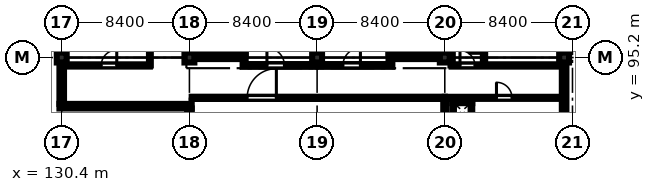
"""IFC4 building model, lengths in metres.
Left out: names, types, materials, properties, quantities, classifications, styles, units other than length and angle.
Written with IfcOpenShell. Run it as: python <this file> out.ifc"""

import sys

from ifc_helpers import new_model, si_unit, direction, frame, frame_2d, origin, origin_2d, place, context, subcontext, project, spatial, rectangle, extrude, element, fill, save


model = new_model("IFC4")
c1 = context("Model", 3, precision=1e-05, world=origin(), true_north=direction((0.0, 1.0)))
c2 = subcontext(c1, "Body", "Model", "MODEL_VIEW")
j1 = project(units=[si_unit("LENGTHUNIT", "METRE"), si_unit("PLANEANGLEUNIT", "RADIAN")], contexts=[c1])
p1 = place(None, origin())
s1 = spatial("IfcSite", under=j1, at=p1, CompositionType="ELEMENT")
p2 = place(p1, origin())
s2 = spatial("IfcBuilding", under=s1, at=p2, CompositionType="ELEMENT")
p3 = place(p2, frame((0.0, 0.0, 61.2)))
s3 = spatial("IfcBuildingStorey", under=s2, at=p3, CompositionType="ELEMENT", Elevation=61.2)
for number, where, z_axis, x_axis in (
    (1, (130.4, 95.2, 0.0), (0.0, 0.0, 1.0), (1.0, 0.0, 0.0)),
    (2, (138.8, 95.2, 0.0), (0.0, 0.0, 1.0), (1.0, 0.0, 0.0)),
    (3, (147.2, 95.2, 0.0), (0.0, 0.0, 1.0), (1.0, 0.0, 0.0)),
    (4, (155.6, 95.2, 0.0), (0.0, 0.0, 1.0), (1.0, 0.0, 0.0)),
    (5, (163.45, 95.2, 0.0), (0.0, 0.0, 1.0), (1.0, 0.0, 0.0)),
):
    element("IfcColumn", number, at=place(p3, frame(where, z_axis=z_axis, x_axis=x_axis)), inside=s3, PredefinedType="COLUMN", context=c2, shape_type="SweptSolid", body=[
        extrude(rectangle(XDim=0.65, YDim=0.65, at=origin_2d()), origin(), (0.0, 0.0, 1.0), 4.28),
    ])
p4 = place(p3, frame((138.7, 95.275, 0.0), z_axis=(0.0, 0.0, 1.0), x_axis=(1.0, 0.0, 0.0)))
e6 = element("IfcWall", 6, at=p4, inside=s3, PredefinedType="SHEAR", context=c2, shape_type="SweptSolid", body=[
    extrude(rectangle(XDim=3.8, YDim=0.35, at=frame_2d((1.9, 0.0))), origin(), (0.0, 0.0, 1.0), 4.28),
])
p5 = place(p3, frame((138.875, 95.45, 0.0), z_axis=(0.0, 0.0, 1.0), x_axis=(0.0, 1.0, 0.0)))
e7 = element("IfcWall", 7, at=p5, inside=s3, PredefinedType="SHEAR", context=c2, shape_type="SweptSolid", body=[
    extrude(rectangle(XDim=7.9, YDim=0.35, at=frame_2d((3.95, 0.0))), origin(), (0.0, 0.0, 1.0), 4.28),
])
p6 = place(p3, frame((142.325, 95.45, 0.0), z_axis=(0.0, 0.0, 1.0), x_axis=(0.0, 1.0, 0.0)))
e8 = element("IfcWall", 8, at=p6, inside=s3, PredefinedType="SHEAR", context=c2, shape_type="SweptSolid", body=[
    extrude(rectangle(XDim=7.9, YDim=0.35, at=frame_2d((3.95, 0.0))), origin(), (0.0, 0.0, 1.0), 4.28),
])
p7 = place(p6, frame((0.22, 0.0, 0.0)))
e9 = element("IfcOpeningElement", 9, at=p7, cuts=e8, PredefinedType="OPENING", context=c2, shape_type="SweptSolid", body=[
    extrude(rectangle(XDim=1.15, YDim=2.15, at=frame_2d((0.575, 1.075))), frame((0.0, 0.185, 0.0), z_axis=(0.0, -1.0, 0.0), x_axis=(1.0, 0.0, 0.0)), (0.0, 0.0, 1.0), 0.37),
])
p8 = place(p3, frame((151.9, 95.275, 0.0), z_axis=(0.0, 0.0, 1.0), x_axis=(1.0, 0.0, 0.0)))
e10 = element("IfcWall", 10, at=p8, inside=s3, PredefinedType="SHEAR", context=c2, shape_type="SweptSolid", body=[
    extrude(rectangle(XDim=3.8, YDim=0.35, at=frame_2d((1.9, 0.0))), origin(), (0.0, 0.0, 1.0), 4.28),
])
p9 = place(p3, frame((152.075, 95.45, 0.0), z_axis=(0.0, 0.0, 1.0), x_axis=(0.0, 1.0, 0.0)))
e11 = element("IfcWall", 11, at=p9, inside=s3, PredefinedType="SHEAR", context=c2, shape_type="SweptSolid", body=[
    extrude(rectangle(XDim=7.9, YDim=0.35, at=frame_2d((3.95, 0.0))), origin(), (0.0, 0.0, 1.0), 4.28),
])
p10 = place(p9, frame((0.35, 0.0, 0.0)))
e12 = element("IfcOpeningElement", 12, at=p10, cuts=e11, PredefinedType="OPENING", context=c2, shape_type="SweptSolid", body=[
    extrude(rectangle(XDim=1.15, YDim=2.15, at=frame_2d((0.575, 1.075))), frame((0.0, 0.185, 0.0), z_axis=(0.0, -1.0, 0.0), x_axis=(1.0, 0.0, 0.0)), (0.0, 0.0, 1.0), 0.37),
])
p11 = place(p3, frame((155.525, 95.45, 0.0), z_axis=(0.0, 0.0, 1.0), x_axis=(0.0, 1.0, 0.0)))
e13 = element("IfcWall", 13, at=p11, inside=s3, PredefinedType="SHEAR", context=c2, shape_type="SweptSolid", body=[
    extrude(rectangle(XDim=7.9, YDim=0.35, at=frame_2d((3.95, 0.0))), origin(), (0.0, 0.0, 1.0), 4.28),
])
p12 = place(p3, frame((163.45, 94.875, 0.0), z_axis=(0.0, 0.0, 1.0), x_axis=(0.0, -1.0, 0.0)))
e14 = element("IfcWall", 14, at=p12, inside=s3, PredefinedType="STANDARD", context=c2, shape_type="SweptSolid", body=[
    extrude(rectangle(XDim=7.75, YDim=0.3, at=frame_2d((3.875, 0.0))), origin(), (0.0, 0.0, 1.0), 3.58),
])
p13 = place(p12, frame((4.2, 0.0, 1.1)))
e15 = element("IfcOpeningElement", 15, at=p13, cuts=e14, PredefinedType="OPENING", context=c2, shape_type="SweptSolid", body=[
    extrude(rectangle(XDim=1.8, YDim=1.8, at=frame_2d((0.9, 0.9))), frame((0.0, 0.16, 0.0), z_axis=(0.0, -1.0, 0.0), x_axis=(1.0, 0.0, 0.0)), (0.0, 0.0, 1.0), 0.32),
])
p14 = place(p3, frame((163.45, 103.275, 0.0), z_axis=(0.0, 0.0, 1.0), x_axis=(0.0, -1.0, 0.0)))
e16 = element("IfcWall", 16, at=p14, inside=s3, PredefinedType="STANDARD", context=c2, shape_type="SweptSolid", body=[
    extrude(rectangle(XDim=7.75, YDim=0.3, at=frame_2d((3.875, 0.0))), origin(), (0.0, 0.0, 1.0), 3.58),
])
p15 = place(p14, frame((1.15, 0.0, 1.1)))
e17 = element("IfcOpeningElement", 17, at=p15, cuts=e16, PredefinedType="OPENING", context=c2, shape_type="SweptSolid", body=[
    extrude(rectangle(XDim=1.4, YDim=1.4, at=frame_2d((0.7, 0.7))), frame((0.0, 0.16, 0.0), z_axis=(0.0, -1.0, 0.0), x_axis=(1.0, 0.0, 0.0)), (0.0, 0.0, 1.0), 0.32),
])
p16 = place(p3, frame((130.4, 92.15, 0.0), z_axis=(0.0, 0.0, 1.0), x_axis=(0.0, 1.0, 0.0)))
e18 = element("IfcWall", 18, at=p16, inside=s3, PredefinedType="STANDARD", context=c2, shape_type="SweptSolid", body=[
    extrude(rectangle(XDim=2.725, YDim=0.3, at=frame_2d((1.363, 0.0))), origin(), (0.0, 0.0, 1.0), 4.28),
])
p17 = place(p3, frame((138.8, 87.125, 0.0), z_axis=(0.0, 0.0, 1.0), x_axis=(0.0, 1.0, 0.0)))
e19 = element("IfcWall", 19, at=p17, inside=s3, PredefinedType="STANDARD", context=c2, shape_type="SweptSolid", body=[
    extrude(rectangle(XDim=4.725, YDim=0.3, at=frame_2d((2.363, 0.0))), origin(), (0.0, 0.0, 1.0), 3.58),
])
p18 = place(p17, frame((2.4, 0.0, 0.95)))
e20 = element("IfcOpeningElement", 20, at=p18, cuts=e19, PredefinedType="OPENING", context=c2, shape_type="SweptSolid", body=[
    extrude(rectangle(XDim=1.5, YDim=1.8, at=frame_2d((0.75, 0.9))), frame((0.0, 0.16, 0.0), z_axis=(0.0, -1.0, 0.0), x_axis=(1.0, 0.0, 0.0)), (0.0, 0.0, 1.0), 0.32),
])
p19 = place(p3, frame((130.4, 95.525, 0.0), z_axis=(0.0, 0.0, 1.0), x_axis=(0.0, 1.0, 0.0)))
e21 = element("IfcWall", 21, at=p19, inside=s3, PredefinedType="STANDARD", context=c2, shape_type="SweptSolid", body=[
    extrude(rectangle(XDim=7.75, YDim=0.3, at=frame_2d((3.875, 0.0))), origin(), (0.0, 0.0, 1.0), 3.58),
])
p20 = place(p19, frame((2.4, 0.0, 1.0)))
e22 = element("IfcOpeningElement", 22, at=p20, cuts=e21, PredefinedType="OPENING", context=c2, shape_type="SweptSolid", body=[
    extrude(rectangle(XDim=1.8, YDim=1.8, at=frame_2d((0.9, 0.9))), frame((0.0, 0.16, 0.0), z_axis=(0.0, -1.0, 0.0), x_axis=(1.0, 0.0, 0.0)), (0.0, 0.0, 1.0), 0.32),
])
p21 = place(p3, frame((138.95, 92.0, 0.0), z_axis=(0.0, 0.0, 1.0), x_axis=(-1.0, 0.0, 0.0)))
e23 = element("IfcWall", 23, at=p21, inside=s3, PredefinedType="STANDARD", context=c2, shape_type="SweptSolid", body=[
    extrude(rectangle(XDim=8.7, YDim=0.3, at=frame_2d((4.35, 0.0))), origin(), (0.0, 0.0, 1.0), 4.28),
])
p22 = place(p3, frame((142.3, 94.68, 0.0), z_axis=(0.0, 0.0, 1.0), x_axis=(1.0, 0.0, 0.0)))
e24 = element("IfcWall", 24, at=p22, inside=s3, PredefinedType="STANDARD", context=c2, shape_type="SweptSolid", body=[
    extrude(rectangle(XDim=4.8, YDim=0.18, at=frame_2d((2.4, 0.0))), origin(), (0.0, 0.0, 1.0), 4.28),
])
p23 = place(p22, frame((1.6, 0.0, 0.0)))
e25 = element("IfcOpeningElement", 25, at=p23, cuts=e24, PredefinedType="OPENING", context=c2, shape_type="SweptSolid", body=[
    extrude(rectangle(XDim=1.15, YDim=2.15, at=frame_2d((0.575, 1.075))), frame((0.0, 0.1, 0.0), z_axis=(0.0, -1.0, 0.0), x_axis=(1.0, 0.0, 0.0)), (0.0, 0.0, 1.0), 0.2),
])
p24 = place(p3, frame((147.3, 94.68, 0.0), z_axis=(0.0, 0.0, 1.0), x_axis=(1.0, 0.0, 0.0)))
e26 = element("IfcWall", 26, at=p24, inside=s3, PredefinedType="STANDARD", context=c2, shape_type="SweptSolid", body=[
    extrude(rectangle(XDim=4.85, YDim=0.18, at=frame_2d((2.425, 0.0))), origin(), (0.0, 0.0, 1.0), 4.28),
])
p25 = place(p24, frame((1.6, 0.0, 0.0)))
e27 = element("IfcOpeningElement", 27, at=p25, cuts=e26, PredefinedType="OPENING", context=c2, shape_type="SweptSolid", body=[
    extrude(rectangle(XDim=1.15, YDim=2.15, at=frame_2d((0.575, 1.075))), frame((0.0, 0.1, 0.0), z_axis=(0.0, -1.0, 0.0), x_axis=(1.0, 0.0, 0.0)), (0.0, 0.0, 1.0), 0.2),
])
p26 = place(p3, frame((156.05, 94.68, 0.0), z_axis=(0.0, 0.0, 1.0), x_axis=(1.0, 0.0, 0.0)))
e28 = element("IfcWall", 28, at=p26, inside=s3, PredefinedType="PARTITIONING", context=c2, shape_type="SweptSolid", body=[
    extrude(rectangle(XDim=7.15, YDim=0.15, at=frame_2d((3.575, 0.0))), origin(), (0.0, 0.0, 1.0), 4.28),
])
p27 = place(p26, frame((0.55, 0.0, 0.0)))
e29 = element("IfcOpeningElement", 29, at=p27, cuts=e28, PredefinedType="OPENING", context=c2, shape_type="SweptSolid", body=[
    extrude(rectangle(XDim=0.98, YDim=2.12, at=frame_2d((0.49, 1.06))), frame((0.0, 0.085, 0.0), z_axis=(0.0, -1.0, 0.0), x_axis=(1.0, 0.0, 0.0)), (0.0, 0.0, 1.0), 0.17),
])
p28 = place(p3, frame((158.18, 94.68, 0.0), z_axis=(0.0, 0.0, 1.0), x_axis=(0.0, 1.0, 0.0)))
e30 = element("IfcWall", 30, at=p28, inside=s3, PredefinedType="PARTITIONING", context=c2, shape_type="SweptSolid", body=[
    extrude(rectangle(XDim=8.57, YDim=0.15, at=frame_2d((4.285, 0.0))), origin(), (0.0, 0.0, 1.0), 4.28),
])
p29 = place(p28, frame((0.8, 0.0, 0.0)))
e31 = element("IfcOpeningElement", 31, at=p29, cuts=e30, PredefinedType="OPENING", context=c2, shape_type="SweptSolid", body=[
    extrude(rectangle(XDim=1.0, YDim=2.12, at=frame_2d((0.5, 1.06))), frame((0.0, 0.085, 0.0), z_axis=(0.0, -1.0, 0.0), x_axis=(1.0, 0.0, 0.0)), (0.0, 0.0, 1.0), 0.17),
])
p30 = place(p28, frame((3.5, 0.0, 0.0)))
e32 = element("IfcOpeningElement", 32, at=p30, cuts=e30, PredefinedType="OPENING", context=c2, shape_type="SweptSolid", body=[
    extrude(rectangle(XDim=0.92, YDim=2.1, at=frame_2d((0.46, 1.05))), frame((0.0, 0.085, 0.0), z_axis=(0.0, -1.0, 0.0), x_axis=(1.0, 0.0, 0.0)), (0.0, 0.0, 1.0), 0.17),
])
p31 = place(p28, frame((6.4, 0.0, 0.0)))
e33 = element("IfcOpeningElement", 33, at=p31, cuts=e30, PredefinedType="OPENING", context=c2, shape_type="SweptSolid", body=[
    extrude(rectangle(XDim=0.92, YDim=2.1, at=frame_2d((0.46, 1.05))), frame((0.0, 0.085, 0.0), z_axis=(0.0, -1.0, 0.0), x_axis=(1.0, 0.0, 0.0)), (0.0, 0.0, 1.0), 0.17),
])
p32 = place(p3, frame((156.05, 94.68, 0.0), z_axis=(0.0, 0.0, 1.0), x_axis=(0.0, 1.0, 0.0)))
e34 = element("IfcWall", 34, at=p32, inside=s3, PredefinedType="PARTITIONING", context=c2, shape_type="SweptSolid", body=[
    extrude(rectangle(XDim=8.57, YDim=0.15, at=frame_2d((4.285, 0.0))), origin(), (0.0, 0.0, 1.0), 4.28),
])
p33 = place(p3, frame((136.2, 94.68, 0.0), z_axis=(0.0, 0.0, 1.0), x_axis=(0.0, 1.0, 0.0)))
e35 = element("IfcWall", 35, at=p33, inside=s3, PredefinedType="PARTITIONING", context=c2, shape_type="SweptSolid", body=[
    extrude(rectangle(XDim=9.07, YDim=0.12, at=frame_2d((4.535, 0.0))), origin(), (0.0, 0.0, 1.0), 4.28),
])
p34 = place(p3, frame((130.8, 94.68, 0.0), z_axis=(0.0, 0.0, 1.0), x_axis=(1.0, 0.0, 0.0)))
e36 = element("IfcWall", 36, at=p34, inside=s3, PredefinedType="PARTITIONING", context=c2, shape_type="SweptSolid", body=[
    extrude(rectangle(XDim=5.4, YDim=0.145, at=frame_2d((2.7, 0.0))), origin(), (0.0, 0.0, 1.0), 4.28),
])
p35 = place(p34, frame((2.2, 0.0, 0.0)))
e37 = element("IfcOpeningElement", 37, at=p35, cuts=e36, PredefinedType="OPENING", context=c2, shape_type="SweptSolid", body=[
    extrude(rectangle(XDim=1.02, YDim=2.15, at=frame_2d((0.51, 1.075))), frame((0.0, 0.083, 0.0), z_axis=(0.0, -1.0, 0.0), x_axis=(1.0, 0.0, 0.0)), (0.0, 0.0, 1.0), 0.165),
])
p36 = place(p3, frame((138.95, 92.55, 0.0), z_axis=(0.0, 0.0, 1.0), x_axis=(1.0, 0.0, 0.0)))
e38 = element("IfcWall", 38, at=p36, inside=s3, PredefinedType="PARTITIONING", context=c2, shape_type="SweptSolid", body=[
    extrude(rectangle(XDim=16.65, YDim=0.145, at=frame_2d((8.325, 0.0))), origin(), (0.0, 0.0, 1.0), 4.28),
])
p37 = place(p36, frame((3.65, 0.0, 0.0)))
e39 = element("IfcOpeningElement", 39, at=p37, cuts=e38, PredefinedType="OPENING", context=c2, shape_type="SweptSolid", body=[
    extrude(rectangle(XDim=1.92, YDim=2.28, at=frame_2d((0.96, 1.14))), frame((0.0, 0.083, 0.0), z_axis=(0.0, -1.0, 0.0), x_axis=(1.0, 0.0, 0.0)), (0.0, 0.0, 1.0), 0.165),
])
p38 = place(p3, frame((155.6, 92.55, 0.0), z_axis=(0.0, 0.0, 1.0), x_axis=(1.0, 0.0, 0.0)))
e40 = element("IfcWall", 40, at=p38, inside=s3, PredefinedType="PARTITIONING", context=c2, shape_type="SweptSolid", body=[
    extrude(rectangle(XDim=7.75, YDim=0.135, at=frame_2d((3.875, 0.0))), origin(), (0.0, 0.0, 1.0), 4.28),
])
p39 = place(p38, frame((3.4, 0.0, 0.0)))
e41 = element("IfcOpeningElement", 41, at=p39, cuts=e40, PredefinedType="OPENING", context=c2, shape_type="SweptSolid", body=[
    extrude(rectangle(XDim=1.02, YDim=2.15, at=frame_2d((0.51, 1.075))), frame((0.0, 0.077, 0.0), z_axis=(0.0, -1.0, 0.0), x_axis=(1.0, 0.0, 0.0)), (0.0, 0.0, 1.0), 0.155),
])
p40 = place(p3, frame((155.6, 78.55, 0.0), z_axis=(0.0, 0.0, 1.0), x_axis=(0.0, 1.0, 0.0)))
e42 = element("IfcWall", 42, at=p40, inside=s3, PredefinedType="SOLIDWALL", context=c2, shape_type="SweptSolid", body=[
    extrude(rectangle(XDim=14.0, YDim=0.2, at=frame_2d((7.0, 0.0))), origin(), (0.0, 0.0, 1.0), 3.58),
])
p41 = place(p3, frame((156.095, 92.252, 0.0), z_axis=(0.0, 0.0, 1.0), x_axis=(1.0, 0.0, 0.0)))
e43 = element("IfcWall", 43, at=p41, inside=s3, PredefinedType="PARTITIONING", context=c2, shape_type="SweptSolid", body=[
    extrude(rectangle(XDim=1.31, YDim=0.105, at=frame_2d((0.655, 0.0))), origin(), (0.0, 0.0, 1.0), 4.28),
])
for number, where, z_axis, x_axis in (
    (44, (156.147, 91.2, 0.0), (0.0, 0.0, 1.0), (0.0, 1.0, 0.0)),
    (45, (157.353, 91.2, 0.0), (0.0, 0.0, 1.0), (0.0, 1.0, 0.0)),
):
    element("IfcWall", number, at=place(p3, frame(where, z_axis=z_axis, x_axis=x_axis)), inside=s3, PredefinedType="PARTITIONING", context=c2, shape_type="SweptSolid", body=[
        extrude(rectangle(XDim=1.0, YDim=0.105, at=frame_2d((0.5, 0.0))), origin(), (0.0, 0.0, 1.0), 4.28),
    ])
p42 = place(p23, origin())
e46 = element("IfcDoor", 46, at=p42, inside=s3, OperationType="SINGLE_SWING_LEFT", PredefinedType="DOOR", context=c2, shape_type="SweptSolid", body=[
    extrude(rectangle(XDim=1.15, YDim=2.15, at=frame_2d((0.575, 1.075))), frame((0.0, 0.025, 0.0), z_axis=(0.0, -1.0, 0.0), x_axis=(1.0, 0.0, 0.0)), (0.0, 0.0, 1.0), 0.05),
])
fill(e25, e46)
p43 = place(p25, origin())
e47 = element("IfcDoor", 47, at=p43, inside=s3, OperationType="SINGLE_SWING_RIGHT", PredefinedType="DOOR", context=c2, shape_type="SweptSolid", body=[
    extrude(rectangle(XDim=1.15, YDim=2.15, at=frame_2d((0.575, 1.075))), frame((0.0, 0.025, 0.0), z_axis=(0.0, -1.0, 0.0), x_axis=(1.0, 0.0, 0.0)), (0.0, 0.0, 1.0), 0.05),
])
fill(e27, e47)
p44 = place(p27, origin())
e48 = element("IfcDoor", 48, at=p44, inside=s3, OperationType="SINGLE_SWING_LEFT", PredefinedType="DOOR", context=c2, shape_type="SweptSolid", body=[
    extrude(rectangle(XDim=0.98, YDim=2.12, at=frame_2d((0.49, 1.06))), frame((0.0, 0.025, 0.0), z_axis=(0.0, -1.0, 0.0), x_axis=(1.0, 0.0, 0.0)), (0.0, 0.0, 1.0), 0.05),
])
fill(e29, e48)
p45 = place(p29, origin())
e49 = element("IfcDoor", 49, at=p45, inside=s3, OperationType="SINGLE_SWING_LEFT", PredefinedType="DOOR", context=c2, shape_type="SweptSolid", body=[
    extrude(rectangle(XDim=1.0, YDim=2.12, at=frame_2d((0.5, 1.06))), frame((0.0, 0.025, 0.0), z_axis=(0.0, -1.0, 0.0), x_axis=(1.0, 0.0, 0.0)), (0.0, 0.0, 1.0), 0.05),
])
fill(e31, e49)
p46 = place(p35, origin())
e50 = element("IfcDoor", 50, at=p46, inside=s3, OperationType="SINGLE_SWING_RIGHT", PredefinedType="DOOR", context=c2, shape_type="SweptSolid", body=[
    extrude(rectangle(XDim=1.02, YDim=2.15, at=frame_2d((0.51, 1.075))), frame((0.0, 0.025, 0.0), z_axis=(0.0, -1.0, 0.0), x_axis=(1.0, 0.0, 0.0)), (0.0, 0.0, 1.0), 0.05),
])
fill(e37, e50)
p47 = place(p37, origin())
e51 = element("IfcDoor", 51, at=p47, inside=s3, OperationType="SINGLE_SWING_RIGHT", PredefinedType="DOOR", context=c2, shape_type="SweptSolid", body=[
    extrude(rectangle(XDim=1.92, YDim=2.28, at=frame_2d((0.96, 1.14))), frame((0.0, 0.025, 0.0), z_axis=(0.0, -1.0, 0.0), x_axis=(1.0, 0.0, 0.0)), (0.0, 0.0, 1.0), 0.05),
])
fill(e39, e51)
p48 = place(p39, origin())
e52 = element("IfcDoor", 52, at=p48, inside=s3, OperationType="SINGLE_SWING_LEFT", PredefinedType="DOOR", context=c2, shape_type="SweptSolid", body=[
    extrude(rectangle(XDim=1.02, YDim=2.15, at=frame_2d((0.51, 1.075))), frame((0.0, 0.025, 0.0), z_axis=(0.0, -1.0, 0.0), x_axis=(1.0, 0.0, 0.0)), (0.0, 0.0, 1.0), 0.05),
])
fill(e41, e52)
save(model, sys.argv[1])
